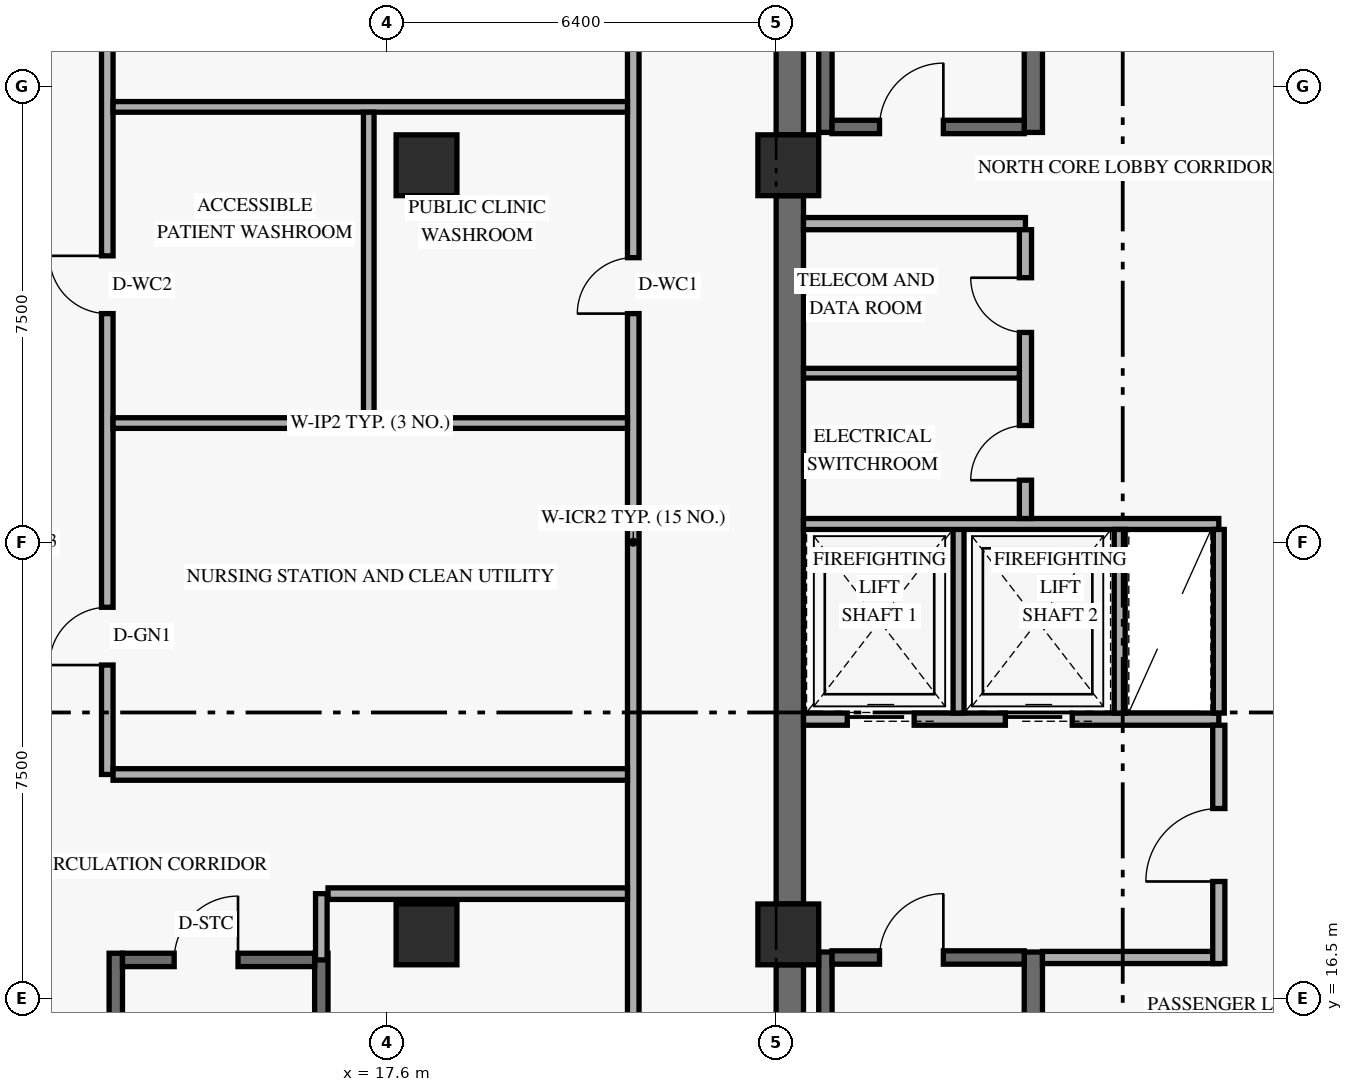
"""IFC4 building model, lengths in metres.
Left out: names, types, materials, properties, quantities, classifications, styles, units other than length and angle.
Written with IfcOpenShell. Run it as: python <this file> out.ifc"""

import sys

from ifc_helpers import new_model, si_unit, direction, frame, frame_2d, origin, origin_2d, place, context, subcontext, project, spatial, rectangle, extrude, element, fill, save


model = new_model("IFC4")
c1 = context("Model", 3, precision=1e-05, world=origin(), true_north=direction((0.0, 1.0)))
c2 = subcontext(c1, "Body", "Model", "MODEL_VIEW")
j1 = project(units=[si_unit("LENGTHUNIT", "METRE"), si_unit("PLANEANGLEUNIT", "RADIAN")], contexts=[c1])
p1 = place(None, origin())
s1 = spatial("IfcSite", under=j1, at=p1, CompositionType="ELEMENT")
p2 = place(p1, origin())
s2 = spatial("IfcBuilding", under=s1, at=p2, CompositionType="ELEMENT")
p3 = place(p2, frame((0.0, 0.0, 9.6)))
s3 = spatial("IfcBuildingStorey", under=s2, at=p3, CompositionType="ELEMENT", Elevation=9.6)
p4 = place(p3, frame((24.225, 9.75, 0.0), z_axis=(0.0, 0.0, 1.0), x_axis=(0.0, 1.0, 0.0)))
e1 = element("IfcWall", 1, at=p4, inside=s3, PredefinedType="SHEAR", context=c2, shape_type="SweptSolid", body=[
    extrude(rectangle(XDim=7.3, YDim=0.45, at=frame_2d((3.65, 0.0))), origin(), (0.0, 0.0, 1.0), 3.75),
])
p5 = place(p3, frame((24.225, 18.05, 0.0), z_axis=(0.0, 0.0, 1.0), x_axis=(0.0, 1.0, 0.0)))
e2 = element("IfcWall", 2, at=p5, inside=s3, PredefinedType="SHEAR", context=c2, shape_type="SweptSolid", body=[
    extrude(rectangle(XDim=11.65, YDim=0.45, at=frame_2d((5.825, 0.0))), origin(), (0.0, 0.0, 1.0), 3.75),
])
p6 = place(p3, frame((24.225, 30.7, 0.0), z_axis=(0.0, 0.0, 1.0), x_axis=(0.0, 1.0, 0.0)))
e3 = element("IfcWall", 3, at=p6, inside=s3, PredefinedType="SHEAR", context=c2, shape_type="SweptSolid", body=[
    extrude(rectangle(XDim=7.55, YDim=0.45, at=frame_2d((3.775, 0.0))), origin(), (0.0, 0.0, 1.0), 3.75),
])
p7 = place(p3, frame((24.81, 9.5, 0.0), z_axis=(0.0, 0.0, 1.0), x_axis=(0.0, 1.0, 0.0)))
e4 = element("IfcWall", 4, at=p7, inside=s3, PredefinedType="SHEAR", context=c2, shape_type="SweptSolid", body=[
    extrude(rectangle(XDim=7.76, YDim=0.22, at=frame_2d((3.88, 0.0))), origin(), (0.0, 0.0, 1.0), 4.52),
])
p8 = place(p3, frame((28.23, 9.5, 0.0), z_axis=(0.0, 0.0, 1.0), x_axis=(0.0, 1.0, 0.0)))
e5 = element("IfcWall", 5, at=p8, inside=s3, PredefinedType="SHEAR", context=c2, shape_type="SweptSolid", body=[
    extrude(rectangle(XDim=7.76, YDim=0.3, at=frame_2d((3.88, 0.0))), origin(), (0.0, 0.0, 1.0), 4.52),
])
p9 = place(p3, frame((24.92, 17.17, 0.0), z_axis=(0.0, 0.0, 1.0), x_axis=(1.0, 0.0, 0.0)))
e6 = element("IfcWall", 6, at=p9, inside=s3, PredefinedType="SHEAR", context=c2, shape_type="SweptSolid", body=[
    extrude(rectangle(XDim=3.16, YDim=0.22, at=frame_2d((1.58, 0.0))), origin(), (0.0, 0.0, 1.0), 4.52),
])
p10 = place(p9, frame((0.78, 0.0, 0.0)))
e7 = element("IfcOpeningElement", 7, at=p10, cuts=e6, PredefinedType="OPENING", context=c2, shape_type="SweptSolid", body=[
    extrude(rectangle(XDim=1.05, YDim=2.15, at=frame_2d((0.525, 1.075))), frame((0.0, 0.12, 0.0), z_axis=(0.0, -1.0, 0.0), x_axis=(1.0, 0.0, 0.0)), (0.0, 0.0, 1.0), 0.24),
])
p11 = place(p3, frame((24.81, 30.74, 0.0), z_axis=(0.0, 0.0, 1.0), x_axis=(0.0, 1.0, 0.0)))
e8 = element("IfcWall", 8, at=p11, inside=s3, PredefinedType="SHEAR", context=c2, shape_type="SweptSolid", body=[
    extrude(rectangle(XDim=7.76, YDim=0.22, at=frame_2d((3.88, 0.0))), origin(), (0.0, 0.0, 1.0), 4.52),
])
p12 = place(p3, frame((28.23, 30.74, 0.0), z_axis=(0.0, 0.0, 1.0), x_axis=(0.0, 1.0, 0.0)))
e9 = element("IfcWall", 9, at=p12, inside=s3, PredefinedType="SHEAR", context=c2, shape_type="SweptSolid", body=[
    extrude(rectangle(XDim=7.76, YDim=0.3, at=frame_2d((3.88, 0.0))), origin(), (0.0, 0.0, 1.0), 4.52),
])
p13 = place(p3, frame((24.92, 30.83, 0.0), z_axis=(0.0, 0.0, 1.0), x_axis=(1.0, 0.0, 0.0)))
e10 = element("IfcWall", 10, at=p13, inside=s3, PredefinedType="SHEAR", context=c2, shape_type="SweptSolid", body=[
    extrude(rectangle(XDim=3.16, YDim=0.22, at=frame_2d((1.58, 0.0))), origin(), (0.0, 0.0, 1.0), 4.52),
])
p14 = place(p13, frame((0.78, 0.0, 0.0)))
e11 = element("IfcOpeningElement", 11, at=p14, cuts=e10, PredefinedType="OPENING", context=c2, shape_type="SweptSolid", body=[
    extrude(rectangle(XDim=1.05, YDim=2.15, at=frame_2d((0.525, 1.075))), frame((0.0, 0.12, 0.0), z_axis=(0.0, -1.0, 0.0), x_axis=(1.0, 0.0, 0.0)), (0.0, 0.0, 1.0), 0.24),
])
for number, where, z_axis, x_axis in (
    (12, (13.14, 9.26, 0.0), (0.0, 0.0, 1.0), (0.0, 1.0, 0.0)),
    (13, (16.52, 9.26, 0.0), (0.0, 0.0, 1.0), (0.0, 1.0, 0.0)),
):
    element("IfcWall", number, at=place(p3, frame(where, z_axis=z_axis, x_axis=x_axis)), inside=s3, PredefinedType="SHEAR", context=c2, shape_type="SweptSolid", body=[
        extrude(rectangle(XDim=7.98, YDim=0.22, at=frame_2d((3.99, 0.0))), origin(), (0.0, 0.0, 1.0), 4.52),
    ])
p15 = place(p3, frame((13.25, 17.13, 0.0), z_axis=(0.0, 0.0, 1.0), x_axis=(1.0, 0.0, 0.0)))
e14 = element("IfcWall", 14, at=p15, inside=s3, PredefinedType="SHEAR", context=c2, shape_type="SweptSolid", body=[
    extrude(rectangle(XDim=3.16, YDim=0.22, at=frame_2d((1.58, 0.0))), origin(), (0.0, 0.0, 1.0), 4.52),
])
p16 = place(p15, frame((0.85, 0.0, 0.0)))
e15 = element("IfcOpeningElement", 15, at=p16, cuts=e14, PredefinedType="OPENING", context=c2, shape_type="SweptSolid", body=[
    extrude(rectangle(XDim=1.05, YDim=2.15, at=frame_2d((0.525, 1.075))), frame((0.0, 0.12, 0.0), z_axis=(0.0, -1.0, 0.0), x_axis=(1.0, 0.0, 0.0)), (0.0, 0.0, 1.0), 0.24),
])
for number, where, z_axis, x_axis in (
    (16, (18.25, 17.55, 0.0), (0.0, 0.0, 1.0), (1.0, 0.0, 0.0)),
    (17, (18.25, 30.2, 0.0), (0.0, 0.0, 1.0), (1.0, 0.0, 0.0)),
    (18, (24.2, 17.55, 0.0), (0.0, 0.0, 1.0), (1.0, 0.0, 0.0)),
    (19, (24.2, 30.2, 0.0), (0.0, 0.0, 1.0), (1.0, 0.0, 0.0)),
):
    element("IfcColumn", number, at=place(p3, frame(where, z_axis=z_axis, x_axis=x_axis)), inside=s3, PredefinedType="COLUMN", context=c2, shape_type="SweptSolid", body=[
        extrude(rectangle(XDim=1.0, YDim=1.0, at=origin_2d()), origin(), (0.0, 0.0, 1.0), 4.8),
    ])
p17 = place(p3, frame((24.45, 21.09, 0.0), z_axis=(0.0, 0.0, 1.0), x_axis=(1.0, 0.0, 0.0)))
e20 = element("IfcWall", 20, at=p17, inside=s3, PredefinedType="STANDARD", context=c2, shape_type="SweptSolid", body=[
    extrude(rectangle(XDim=6.83, YDim=0.2, at=frame_2d((3.415, 0.0))), origin(), (0.0, 0.0, 1.0), 4.52),
])
p18 = place(p17, frame((0.72, 0.0, 0.0)))
e21 = element("IfcOpeningElement", 21, at=p18, cuts=e20, PredefinedType="OPENING", context=c2, shape_type="SweptSolid", body=[
    extrude(rectangle(XDim=1.1, YDim=2.2, at=frame_2d((0.55, 1.1))), frame((0.0, 0.11, 0.0), z_axis=(0.0, -1.0, 0.0), x_axis=(1.0, 0.0, 0.0)), (0.0, 0.0, 1.0), 0.22),
])
p19 = place(p17, frame((3.32, 0.0, 0.0)))
e22 = element("IfcOpeningElement", 22, at=p19, cuts=e20, PredefinedType="OPENING", context=c2, shape_type="SweptSolid", body=[
    extrude(rectangle(XDim=1.1, YDim=2.2, at=frame_2d((0.55, 1.1))), frame((0.0, 0.11, 0.0), z_axis=(0.0, -1.0, 0.0), x_axis=(1.0, 0.0, 0.0)), (0.0, 0.0, 1.0), 0.22),
])
p20 = place(p3, frame((28.38, 17.17, 0.0), z_axis=(0.0, 0.0, 1.0), x_axis=(1.0, 0.0, 0.0)))
e23 = element("IfcWall", 23, at=p20, inside=s3, PredefinedType="STANDARD", context=c2, shape_type="SweptSolid", body=[
    extrude(rectangle(XDim=2.9, YDim=0.2, at=frame_2d((1.45, 0.0))), origin(), (0.0, 0.0, 1.0), 4.52),
])
p21 = place(p3, frame((31.28, 17.07, 0.0), z_axis=(0.0, 0.0, 1.0), x_axis=(0.0, 1.0, 0.0)))
e24 = element("IfcWall", 24, at=p21, inside=s3, PredefinedType="STANDARD", context=c2, shape_type="SweptSolid", body=[
    extrude(rectangle(XDim=3.92, YDim=0.2, at=frame_2d((1.96, 0.0))), origin(), (0.0, 0.0, 1.0), 3.575),
])
p22 = place(p21, frame((1.35, 0.0, 0.0)))
e25 = element("IfcOpeningElement", 25, at=p22, cuts=e24, PredefinedType="OPENING", context=c2, shape_type="SweptSolid", body=[
    extrude(rectangle(XDim=1.2, YDim=2.15, at=frame_2d((0.6, 1.075))), frame((0.0, 0.11, 0.0), z_axis=(0.0, -1.0, 0.0), x_axis=(1.0, 0.0, 0.0)), (0.0, 0.0, 1.0), 0.22),
])
p23 = place(p3, frame((27.0, 21.19, 0.0), z_axis=(0.0, 0.0, 1.0), x_axis=(0.0, 1.0, 0.0)))
e26 = element("IfcWall", 26, at=p23, inside=s3, PredefinedType="STANDARD", context=c2, shape_type="SweptSolid", body=[
    extrude(rectangle(XDim=3.11, YDim=0.18, at=frame_2d((1.555, 0.0))), origin(), (0.0, 0.0, 1.0), 4.52),
])
p24 = place(p3, frame((24.45, 24.3, 0.0), z_axis=(0.0, 0.0, 1.0), x_axis=(1.0, 0.0, 0.0)))
e27 = element("IfcWall", 27, at=p24, inside=s3, PredefinedType="STANDARD", context=c2, shape_type="SweptSolid", body=[
    extrude(rectangle(XDim=6.83, YDim=0.18, at=frame_2d((3.415, 0.0))), origin(), (0.0, 0.0, 1.0), 4.52),
])
for number, where, z_axis, x_axis in (
    (28, (29.65, 21.19, 0.0), (0.0, 0.0, 1.0), (0.0, 1.0, 0.0)),
    (29, (31.28, 21.19, 0.0), (0.0, 0.0, 1.0), (0.0, 1.0, 0.0)),
):
    element("IfcWall", number, at=place(p3, frame(where, z_axis=z_axis, x_axis=x_axis)), inside=s3, PredefinedType="STANDARD", context=c2, shape_type="SweptSolid", body=[
        extrude(rectangle(XDim=3.02, YDim=0.18, at=frame_2d((1.51, 0.0))), origin(), (0.0, 0.0, 1.0), 4.52),
    ])
p25 = place(p3, frame((24.45, 29.24, 0.0), z_axis=(0.0, 0.0, 1.0), x_axis=(1.0, 0.0, 0.0)))
e30 = element("IfcWall", 30, at=p25, inside=s3, PredefinedType="STANDARD", context=c2, shape_type="SweptSolid", body=[
    extrude(rectangle(XDim=3.65, YDim=0.2, at=frame_2d((1.825, 0.0))), origin(), (0.0, 0.0, 1.0), 4.52),
])
p26 = place(p3, frame((28.1, 24.39, 0.0), z_axis=(0.0, 0.0, 1.0), x_axis=(0.0, 1.0, 0.0)))
e31 = element("IfcWall", 31, at=p26, inside=s3, PredefinedType="STANDARD", context=c2, shape_type="SweptSolid", body=[
    extrude(rectangle(XDim=4.75, YDim=0.2, at=frame_2d((2.375, 0.0))), origin(), (0.0, 0.0, 1.0), 4.52),
])
p27 = place(p26, frame((0.63, 0.0, 0.0)))
e32 = element("IfcOpeningElement", 32, at=p27, cuts=e31, PredefinedType="OPENING", context=c2, shape_type="SweptSolid", body=[
    extrude(rectangle(XDim=0.9, YDim=2.1, at=frame_2d((0.45, 1.05))), frame((0.0, 0.11, 0.0), z_axis=(0.0, -1.0, 0.0), x_axis=(1.0, 0.0, 0.0)), (0.0, 0.0, 1.0), 0.22),
])
p28 = place(p26, frame((3.06, 0.0, 0.0)))
e33 = element("IfcOpeningElement", 33, at=p28, cuts=e31, PredefinedType="OPENING", context=c2, shape_type="SweptSolid", body=[
    extrude(rectangle(XDim=0.9, YDim=2.1, at=frame_2d((0.45, 1.05))), frame((0.0, 0.11, 0.0), z_axis=(0.0, -1.0, 0.0), x_axis=(1.0, 0.0, 0.0)), (0.0, 0.0, 1.0), 0.22),
])
p29 = place(p3, frame((24.45, 26.78, 0.0), z_axis=(0.0, 0.0, 1.0), x_axis=(1.0, 0.0, 0.0)))
e34 = element("IfcWall", 34, at=p29, inside=s3, PredefinedType="PARTITIONING", context=c2, shape_type="SweptSolid", body=[
    extrude(rectangle(XDim=3.55, YDim=0.16, at=frame_2d((1.775, 0.0))), origin(), (0.0, 0.0, 1.0), 4.52),
])
p30 = place(p3, frame((21.65, 6.8, 0.0), z_axis=(0.0, 0.0, 1.0), x_axis=(0.0, 1.0, 0.0)))
e35 = element("IfcWall", 35, at=p30, inside=s3, PredefinedType="STANDARD", context=c2, shape_type="SweptSolid", body=[
    extrude(rectangle(XDim=34.4, YDim=0.19, at=frame_2d((17.2, 0.0))), origin(), (0.0, 0.0, 1.0), 3.575),
])
p31 = place(p30, frame((20.96, 0.0, 0.0)))
e36 = element("IfcOpeningElement", 36, at=p31, cuts=e35, PredefinedType="OPENING", context=c2, shape_type="SweptSolid", body=[
    extrude(rectangle(XDim=0.92, YDim=2.14, at=frame_2d((0.46, 1.07))), frame((0.0, 0.105, 0.0), z_axis=(0.0, -1.0, 0.0), x_axis=(1.0, 0.0, 0.0)), (0.0, 0.0, 1.0), 0.21),
])
p32 = place(p30, frame((28.2, 0.0, 0.0)))
e37 = element("IfcOpeningElement", 37, at=p32, cuts=e35, PredefinedType="OPENING", context=c2, shape_type="SweptSolid", body=[
    extrude(rectangle(XDim=0.95, YDim=2.15, at=frame_2d((0.475, 1.075))), frame((0.0, 0.105, 0.0), z_axis=(0.0, -1.0, 0.0), x_axis=(1.0, 0.0, 0.0)), (0.0, 0.0, 1.0), 0.21),
])
p33 = place(p30, frame((6.0, 0.0, 0.0)))
e38 = element("IfcOpeningElement", 38, at=p33, cuts=e35, PredefinedType="OPENING", context=c2, shape_type="SweptSolid", body=[
    extrude(rectangle(XDim=0.9, YDim=2.1, at=frame_2d((0.45, 1.05))), frame((0.0, 0.105, 0.0), z_axis=(0.0, -1.0, 0.0), x_axis=(1.0, 0.0, 0.0)), (0.0, 0.0, 1.0), 0.21),
])
p34 = place(p3, frame((13.0, 20.18, 0.0), z_axis=(0.0, 0.0, 1.0), x_axis=(0.0, 1.0, 0.0)))
e39 = element("IfcWall", 39, at=p34, inside=s3, PredefinedType="STANDARD", context=c2, shape_type="SweptSolid", body=[
    extrude(rectangle(XDim=19.075, YDim=0.19, at=frame_2d((9.538, 0.0))), origin(), (0.0, 0.0, 1.0), 3.575),
])
p35 = place(p34, frame((1.8, 0.0, 0.0)))
e40 = element("IfcOpeningElement", 40, at=p35, cuts=e39, PredefinedType="OPENING", context=c2, shape_type="SweptSolid", body=[
    extrude(rectangle(XDim=0.95, YDim=2.15, at=frame_2d((0.475, 1.075))), frame((0.0, 0.105, 0.0), z_axis=(0.0, -1.0, 0.0), x_axis=(1.0, 0.0, 0.0)), (0.0, 0.0, 1.0), 0.21),
])
p36 = place(p34, frame((7.58, 0.0, 0.0)))
e41 = element("IfcOpeningElement", 41, at=p36, cuts=e39, PredefinedType="OPENING", context=c2, shape_type="SweptSolid", body=[
    extrude(rectangle(XDim=0.95, YDim=2.14, at=frame_2d((0.475, 1.07))), frame((0.0, 0.105, 0.0), z_axis=(0.0, -1.0, 0.0), x_axis=(1.0, 0.0, 0.0)), (0.0, 0.0, 1.0), 0.21),
])
p37 = place(p3, frame((16.63, 18.22, 0.0), z_axis=(0.0, 0.0, 1.0), x_axis=(1.0, 0.0, 0.0)))
e42 = element("IfcWall", 42, at=p37, inside=s3, PredefinedType="STANDARD", context=c2, shape_type="SweptSolid", body=[
    extrude(rectangle(XDim=4.925, YDim=0.19, at=frame_2d((2.462, 0.0))), origin(), (0.0, 0.0, 1.0), 3.732),
])
p38 = place(p3, frame((16.52, 17.13, 0.0), z_axis=(0.0, 0.0, 1.0), x_axis=(0.0, 1.0, 0.0)))
e43 = element("IfcWall", 43, at=p38, inside=s3, PredefinedType="STANDARD", context=c2, shape_type="SweptSolid", body=[
    extrude(rectangle(XDim=1.09, YDim=0.19, at=frame_2d((0.545, 0.0))), origin(), (0.0, 0.0, 1.0), 3.575),
])
p39 = place(p3, frame((13.095, 20.18, 0.0), z_axis=(0.0, 0.0, 1.0), x_axis=(1.0, 0.0, 0.0)))
e44 = element("IfcWall", 44, at=p39, inside=s3, PredefinedType="STANDARD", context=c2, shape_type="SweptSolid", body=[
    extrude(rectangle(XDim=8.46, YDim=0.19, at=frame_2d((4.23, 0.0))), origin(), (0.0, 0.0, 1.0), 3.732),
])
for number, where, z_axis, x_axis in (
    (45, (13.095, 25.96, 0.0), (0.0, 0.0, 1.0), (1.0, 0.0, 0.0)),
    (46, (13.095, 31.16, 0.0), (0.0, 0.0, 1.0), (1.0, 0.0, 0.0)),
):
    element("IfcWall", number, at=place(p3, frame(where, z_axis=z_axis, x_axis=x_axis)), inside=s3, PredefinedType="PLUMBINGWALL", context=c2, shape_type="SweptSolid", body=[
        extrude(rectangle(XDim=8.46, YDim=0.175, at=frame_2d((4.23, 0.0))), origin(), (0.0, 0.0, 1.0), 3.732),
    ])
p40 = place(p3, frame((17.3, 26.048, 0.0), z_axis=(0.0, 0.0, 1.0), x_axis=(0.0, 1.0, 0.0)))
e47 = element("IfcWall", 47, at=p40, inside=s3, PredefinedType="PLUMBINGWALL", context=c2, shape_type="SweptSolid", body=[
    extrude(rectangle(XDim=5.025, YDim=0.175, at=frame_2d((2.512, 0.0))), origin(), (0.0, 0.0, 1.0), 3.575),
])
p41 = place(p10, frame((1.05, 0.0, 0.0), z_axis=(0.0, 0.0, 1.0), x_axis=(-1.0, 0.0, 0.0)))
e48 = element("IfcDoor", 48, at=p41, inside=s3, OperationType="SINGLE_SWING_LEFT", PredefinedType="DOOR", context=c2, shape_type="SweptSolid", body=[
    extrude(rectangle(XDim=1.05, YDim=2.15, at=frame_2d((0.525, 1.075))), frame((0.0, 0.025, 0.0), z_axis=(0.0, -1.0, 0.0), x_axis=(1.0, 0.0, 0.0)), (0.0, 0.0, 1.0), 0.05),
])
fill(e7, e48)
p42 = place(p14, origin())
e49 = element("IfcDoor", 49, at=p42, inside=s3, OperationType="SINGLE_SWING_RIGHT", PredefinedType="DOOR", context=c2, shape_type="SweptSolid", body=[
    extrude(rectangle(XDim=1.05, YDim=2.15, at=frame_2d((0.525, 1.075))), frame((0.0, 0.025, 0.0), z_axis=(0.0, -1.0, 0.0), x_axis=(1.0, 0.0, 0.0)), (0.0, 0.0, 1.0), 0.05),
])
fill(e11, e49)
p43 = place(p18, origin())
e50 = element("IfcDoor", 50, at=p43, inside=s3, OperationType="SLIDING_TO_LEFT", PredefinedType="DOOR", context=c2, shape_type="SweptSolid", body=[
    extrude(rectangle(XDim=1.1, YDim=2.2, at=frame_2d((0.55, 1.1))), frame((0.0, 0.025, 0.0), z_axis=(0.0, -1.0, 0.0), x_axis=(1.0, 0.0, 0.0)), (0.0, 0.0, 1.0), 0.05),
])
fill(e21, e50)
p44 = place(p19, origin())
e51 = element("IfcDoor", 51, at=p44, inside=s3, OperationType="SLIDING_TO_LEFT", PredefinedType="DOOR", context=c2, shape_type="SweptSolid", body=[
    extrude(rectangle(XDim=1.1, YDim=2.2, at=frame_2d((0.55, 1.1))), frame((0.0, 0.025, 0.0), z_axis=(0.0, -1.0, 0.0), x_axis=(1.0, 0.0, 0.0)), (0.0, 0.0, 1.0), 0.05),
])
fill(e22, e51)
p45 = place(p22, origin())
e52 = element("IfcDoor", 52, at=p45, inside=s3, OperationType="SINGLE_SWING_LEFT", PredefinedType="DOOR", context=c2, shape_type="SweptSolid", body=[
    extrude(rectangle(XDim=1.2, YDim=2.15, at=frame_2d((0.6, 1.075))), frame((0.0, 0.025, 0.0), z_axis=(0.0, -1.0, 0.0), x_axis=(1.0, 0.0, 0.0)), (0.0, 0.0, 1.0), 0.05),
])
fill(e25, e52)
p46 = place(p27, origin())
e53 = element("IfcDoor", 53, at=p46, inside=s3, OperationType="SINGLE_SWING_LEFT", PredefinedType="DOOR", context=c2, shape_type="SweptSolid", body=[
    extrude(rectangle(XDim=0.9, YDim=2.1, at=frame_2d((0.45, 1.05))), frame((0.0, 0.025, 0.0), z_axis=(0.0, -1.0, 0.0), x_axis=(1.0, 0.0, 0.0)), (0.0, 0.0, 1.0), 0.05),
])
fill(e32, e53)
p47 = place(p28, origin())
e54 = element("IfcDoor", 54, at=p47, inside=s3, OperationType="SINGLE_SWING_RIGHT", PredefinedType="DOOR", context=c2, shape_type="SweptSolid", body=[
    extrude(rectangle(XDim=0.9, YDim=2.1, at=frame_2d((0.45, 1.05))), frame((0.0, 0.025, 0.0), z_axis=(0.0, -1.0, 0.0), x_axis=(1.0, 0.0, 0.0)), (0.0, 0.0, 1.0), 0.05),
])
fill(e33, e54)
p48 = place(p16, frame((1.05, 0.0, 0.0), z_axis=(0.0, 0.0, 1.0), x_axis=(-1.0, 0.0, 0.0)))
e55 = element("IfcDoor", 55, at=p48, inside=s3, OperationType="SINGLE_SWING_LEFT", PredefinedType="DOOR", context=c2, shape_type="SweptSolid", body=[
    extrude(rectangle(XDim=1.05, YDim=2.15, at=frame_2d((0.525, 1.075))), frame((0.0, 0.025, 0.0), z_axis=(0.0, -1.0, 0.0), x_axis=(1.0, 0.0, 0.0)), (0.0, 0.0, 1.0), 0.05),
])
fill(e15, e55)
p49 = place(p35, origin())
e56 = element("IfcDoor", 56, at=p49, inside=s3, OperationType="SINGLE_SWING_LEFT", PredefinedType="DOOR", context=c2, shape_type="SweptSolid", body=[
    extrude(rectangle(XDim=0.95, YDim=2.15, at=frame_2d((0.475, 1.075))), frame((0.0, 0.025, 0.0), z_axis=(0.0, -1.0, 0.0), x_axis=(1.0, 0.0, 0.0)), (0.0, 0.0, 1.0), 0.05),
])
fill(e40, e56)
p50 = place(p36, origin())
e57 = element("IfcDoor", 57, at=p50, inside=s3, OperationType="SINGLE_SWING_RIGHT", PredefinedType="DOOR", context=c2, shape_type="SweptSolid", body=[
    extrude(rectangle(XDim=0.95, YDim=2.14, at=frame_2d((0.475, 1.07))), frame((0.0, 0.025, 0.0), z_axis=(0.0, -1.0, 0.0), x_axis=(1.0, 0.0, 0.0)), (0.0, 0.0, 1.0), 0.05),
])
fill(e41, e57)
p51 = place(p31, origin())
e58 = element("IfcDoor", 58, at=p51, inside=s3, OperationType="SINGLE_SWING_LEFT", PredefinedType="DOOR", context=c2, shape_type="SweptSolid", body=[
    extrude(rectangle(XDim=0.92, YDim=2.14, at=frame_2d((0.46, 1.07))), frame((0.0, 0.025, 0.0), z_axis=(0.0, -1.0, 0.0), x_axis=(1.0, 0.0, 0.0)), (0.0, 0.0, 1.0), 0.05),
])
fill(e36, e58)
save(model, sys.argv[1])
